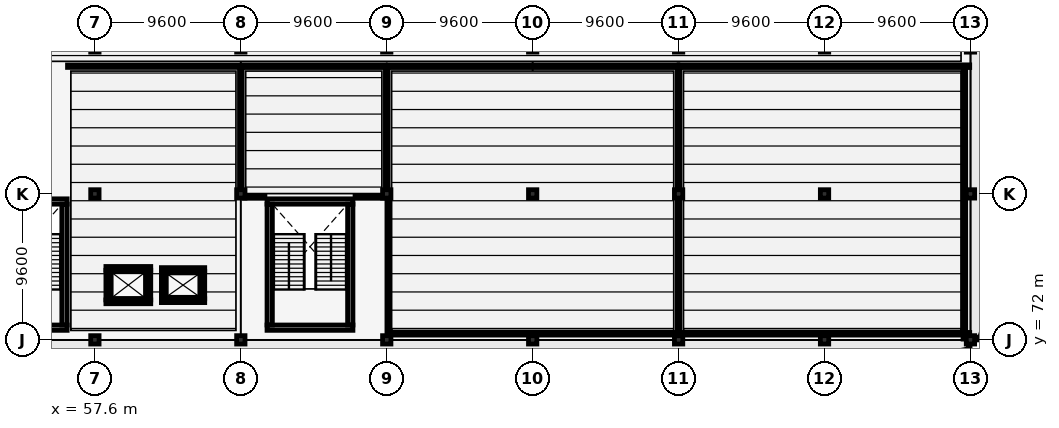
"""IFC4 building model, lengths in metres.
Left out: names, types, materials, properties, quantities, classifications, styles, units other than length and angle.
Written with IfcOpenShell. Run it as: python <this file> out.ifc"""

import sys

from ifc_helpers import new_model, si_unit, direction, frame, frame_2d, origin, origin_2d, place, context, subcontext, project, spatial, rectangle, extrude, element, fill, save


model = new_model("IFC4")
c1 = context("Model", 3, precision=1e-05, world=origin(), true_north=direction((0.0, 1.0)))
c2 = subcontext(c1, "Body", "Model", "MODEL_VIEW")
j1 = project(units=[si_unit("LENGTHUNIT", "METRE"), si_unit("PLANEANGLEUNIT", "RADIAN")], contexts=[c1])
p1 = place(None, origin())
s1 = spatial("IfcSite", under=j1, at=p1, CompositionType="ELEMENT")
p2 = place(p1, origin())
s2 = spatial("IfcBuilding", under=s1, at=p2, CompositionType="ELEMENT")
p3 = place(p2, frame((0.0, 0.0, 4.8)))
s3 = spatial("IfcBuildingStorey", under=s2, at=p3, CompositionType="ELEMENT", Elevation=4.8)
for number, where, z_axis, x_axis in (
    (1, (57.6, 72.0, 0.0), (0.0, 0.0, 1.0), (1.0, 0.0, 0.0)),
    (2, (57.6, 81.6, 0.0), (0.0, 0.0, 1.0), (1.0, 0.0, 0.0)),
    (3, (67.2, 72.0, 0.0), (0.0, 0.0, 1.0), (1.0, 0.0, 0.0)),
    (4, (67.2, 81.6, 0.0), (0.0, 0.0, 1.0), (1.0, 0.0, 0.0)),
    (5, (76.8, 72.0, 0.0), (0.0, 0.0, 1.0), (1.0, 0.0, 0.0)),
    (6, (76.8, 81.6, 0.0), (0.0, 0.0, 1.0), (1.0, 0.0, 0.0)),
    (7, (86.4, 72.0, 0.0), (0.0, 0.0, 1.0), (1.0, 0.0, 0.0)),
    (8, (86.4, 81.6, 0.0), (0.0, 0.0, 1.0), (1.0, 0.0, 0.0)),
    (9, (96.0, 72.0, 0.0), (0.0, 0.0, 1.0), (1.0, 0.0, 0.0)),
    (10, (96.0, 81.6, 0.0), (0.0, 0.0, 1.0), (1.0, 0.0, 0.0)),
    (11, (105.6, 72.0, 0.0), (0.0, 0.0, 1.0), (1.0, 0.0, 0.0)),
    (12, (105.6, 81.6, 0.0), (0.0, 0.0, 1.0), (1.0, 0.0, 0.0)),
    (13, (115.2, 72.0, 0.0), (0.0, 0.0, 1.0), (1.0, 0.0, 0.0)),
    (14, (115.2, 81.6, 0.0), (0.0, 0.0, 1.0), (1.0, 0.0, 0.0)),
):
    element("IfcColumn", number, at=place(p3, frame(where, z_axis=z_axis, x_axis=x_axis)), inside=s3, PredefinedType="COLUMN", context=c2, shape_type="SweptSolid", body=[
        extrude(rectangle(XDim=0.55, YDim=0.55, at=origin_2d()), origin(), (0.0, 0.0, 1.0), 4.8),
    ])
for number, where, z_axis, x_axis in (
    (15, (55.775, 72.8, 0.0), (0.0, 0.0, 1.0), (-1.0, 0.0, 0.0)),
    (16, (50.125, 81.1, 0.0), (0.0, 0.0, 1.0), (1.0, 0.0, 0.0)),
):
    element("IfcWall", number, at=place(p3, frame(where, z_axis=z_axis, x_axis=x_axis)), inside=s3, PredefinedType="SHEAR", context=c2, shape_type="SweptSolid", body=[
        extrude(rectangle(XDim=5.65, YDim=0.35, at=frame_2d((2.825, 0.0))), origin(), (0.0, 0.0, 1.0), 4.55),
    ])
p4 = place(p3, frame((55.6, 80.925, 0.0), z_axis=(0.0, 0.0, 1.0), x_axis=(0.0, -1.0, 0.0)))
e17 = element("IfcWall", 17, at=p4, inside=s3, PredefinedType="SHEAR", context=c2, shape_type="SweptSolid", body=[
    extrude(rectangle(XDim=7.95, YDim=0.35, at=frame_2d((3.975, 0.0))), origin(), (0.0, 0.0, 1.0), 4.55),
])
p5 = place(p4, frame((5.68, 0.0, 0.0)))
e18 = element("IfcOpeningElement", 18, at=p5, cuts=e17, PredefinedType="OPENING", context=c2, shape_type="SweptSolid", body=[
    extrude(rectangle(XDim=2.05, YDim=2.15, at=frame_2d((1.025, 1.075))), frame((0.0, 0.185, 0.0), z_axis=(0.0, -1.0, 0.0), x_axis=(1.0, 0.0, 0.0)), (0.0, 0.0, 1.0), 0.37),
])
for number, where, z_axis, x_axis in (
    (19, (74.575, 72.8, 0.0), (0.0, 0.0, 1.0), (-1.0, 0.0, 0.0)),
    (20, (68.925, 81.1, 0.0), (0.0, 0.0, 1.0), (1.0, 0.0, 0.0)),
):
    element("IfcWall", number, at=place(p3, frame(where, z_axis=z_axis, x_axis=x_axis)), inside=s3, PredefinedType="SHEAR", context=c2, shape_type="SweptSolid", body=[
        extrude(rectangle(XDim=5.65, YDim=0.35, at=frame_2d((2.825, 0.0))), origin(), (0.0, 0.0, 1.0), 4.55),
    ])
p6 = place(p3, frame((69.1, 72.975, 0.0), z_axis=(0.0, 0.0, 1.0), x_axis=(0.0, 1.0, 0.0)))
e21 = element("IfcWall", 21, at=p6, inside=s3, PredefinedType="SHEAR", context=c2, shape_type="SweptSolid", body=[
    extrude(rectangle(XDim=7.95, YDim=0.35, at=frame_2d((3.975, 0.0))), origin(), (0.0, 0.0, 1.0), 4.55),
])
p7 = place(p3, frame((74.4, 80.925, 0.0), z_axis=(0.0, 0.0, 1.0), x_axis=(0.0, -1.0, 0.0)))
e22 = element("IfcWall", 22, at=p7, inside=s3, PredefinedType="SHEAR", context=c2, shape_type="SweptSolid", body=[
    extrude(rectangle(XDim=7.95, YDim=0.35, at=frame_2d((3.975, 0.0))), origin(), (0.0, 0.0, 1.0), 4.55),
])
p8 = place(p7, frame((5.68, 0.0, 0.0)))
e23 = element("IfcOpeningElement", 23, at=p8, cuts=e22, PredefinedType="OPENING", context=c2, shape_type="SweptSolid", body=[
    extrude(rectangle(XDim=2.05, YDim=2.15, at=frame_2d((1.025, 1.075))), frame((0.0, 0.185, 0.0), z_axis=(0.0, -1.0, 0.0), x_axis=(1.0, 0.0, 0.0)), (0.0, 0.0, 1.0), 0.37),
])
p9 = place(p3, frame((61.275, 74.5, 0.0), z_axis=(0.0, 0.0, 1.0), x_axis=(-1.0, 0.0, 0.0)))
e24 = element("IfcWall", 24, at=p9, inside=s3, PredefinedType="SOLIDWALL", context=c2, shape_type="SweptSolid", body=[
    extrude(rectangle(XDim=2.95, YDim=0.25, at=frame_2d((1.475, 0.0))), origin(), (0.0, 0.0, 1.0), 4.55),
])
p10 = place(p3, frame((58.325, 76.7, 0.0), z_axis=(0.0, 0.0, 1.0), x_axis=(1.0, 0.0, 0.0)))
e25 = element("IfcWall", 25, at=p10, inside=s3, PredefinedType="SOLIDWALL", context=c2, shape_type="SweptSolid", body=[
    extrude(rectangle(XDim=2.95, YDim=0.25, at=frame_2d((1.475, 0.0))), origin(), (0.0, 0.0, 1.0), 4.55),
])
p11 = place(p10, frame((0.925, 0.0, 0.0)))
e26 = element("IfcOpeningElement", 26, at=p11, cuts=e25, PredefinedType="OPENING", context=c2, shape_type="SweptSolid", body=[
    extrude(rectangle(XDim=1.1, YDim=2.15, at=frame_2d((0.55, 1.075))), frame((0.0, 0.135, 0.0), z_axis=(0.0, -1.0, 0.0), x_axis=(1.0, 0.0, 0.0)), (0.0, 0.0, 1.0), 0.27),
])
for number, where, z_axis, x_axis in (
    (27, (58.45, 74.625, 0.0), (0.0, 0.0, 1.0), (0.0, 1.0, 0.0)),
    (28, (61.15, 76.575, 0.0), (0.0, 0.0, 1.0), (0.0, -1.0, 0.0)),
):
    element("IfcWall", number, at=place(p3, frame(where, z_axis=z_axis, x_axis=x_axis)), inside=s3, PredefinedType="SOLIDWALL", context=c2, shape_type="SweptSolid", body=[
        extrude(rectangle(XDim=1.95, YDim=0.25, at=frame_2d((0.975, 0.0))), origin(), (0.0, 0.0, 1.0), 4.55),
    ])
p12 = place(p3, frame((64.825, 74.575, 0.0), z_axis=(0.0, 0.0, 1.0), x_axis=(-1.0, 0.0, 0.0)))
e29 = element("IfcWall", 29, at=p12, inside=s3, PredefinedType="SOLIDWALL", context=c2, shape_type="SweptSolid", body=[
    extrude(rectangle(XDim=2.85, YDim=0.25, at=frame_2d((1.425, 0.0))), origin(), (0.0, 0.0, 1.0), 4.55),
])
p13 = place(p3, frame((61.975, 76.625, 0.0), z_axis=(0.0, 0.0, 1.0), x_axis=(1.0, 0.0, 0.0)))
e30 = element("IfcWall", 30, at=p13, inside=s3, PredefinedType="SOLIDWALL", context=c2, shape_type="SweptSolid", body=[
    extrude(rectangle(XDim=2.85, YDim=0.25, at=frame_2d((1.425, 0.0))), origin(), (0.0, 0.0, 1.0), 4.55),
])
p14 = place(p13, frame((0.875, 0.0, 0.0)))
e31 = element("IfcOpeningElement", 31, at=p14, cuts=e30, PredefinedType="OPENING", context=c2, shape_type="SweptSolid", body=[
    extrude(rectangle(XDim=1.1, YDim=2.15, at=frame_2d((0.55, 1.075))), frame((0.0, 0.135, 0.0), z_axis=(0.0, -1.0, 0.0), x_axis=(1.0, 0.0, 0.0)), (0.0, 0.0, 1.0), 0.27),
])
for number, where, z_axis, x_axis in (
    (32, (62.1, 74.7, 0.0), (0.0, 0.0, 1.0), (0.0, 1.0, 0.0)),
    (33, (64.7, 76.5, 0.0), (0.0, 0.0, 1.0), (0.0, -1.0, 0.0)),
):
    element("IfcWall", number, at=place(p3, frame(where, z_axis=z_axis, x_axis=x_axis)), inside=s3, PredefinedType="SOLIDWALL", context=c2, shape_type="SweptSolid", body=[
        extrude(rectangle(XDim=1.8, YDim=0.25, at=frame_2d((0.9, 0.0))), origin(), (0.0, 0.0, 1.0), 4.55),
    ])
p15 = place(p3, frame((67.2, 81.4, 0.0), z_axis=(0.0, 0.0, 1.0), x_axis=(0.0, 1.0, 0.0)))
e34 = element("IfcWall", 34, at=p15, inside=s3, PredefinedType="PARTITIONING", context=c2, shape_type="SweptSolid", body=[
    extrude(rectangle(XDim=8.5, YDim=0.175, at=frame_2d((4.25, 0.0))), origin(), (0.0, 0.0, 1.0), 4.037),
])
p16 = place(p15, frame((3.45, 0.0, 0.0)))
e35 = element("IfcOpeningElement", 35, at=p16, cuts=e34, PredefinedType="OPENING", context=c2, shape_type="SweptSolid", body=[
    extrude(rectangle(XDim=1.6, YDim=2.15, at=frame_2d((0.8, 1.075))), frame((0.0, 0.097, 0.0), z_axis=(0.0, -1.0, 0.0), x_axis=(1.0, 0.0, 0.0)), (0.0, 0.0, 1.0), 0.195),
])
p17 = place(p3, frame((55.8, 90.0, 0.0), z_axis=(0.0, 0.0, 1.0), x_axis=(1.0, 0.0, 0.0)))
e36 = element("IfcWall", 36, at=p17, inside=s3, PredefinedType="PARTITIONING", context=c2, shape_type="SweptSolid", body=[
    extrude(rectangle(XDim=11.3, YDim=0.16, at=frame_2d((5.65, 0.0))), origin(), (0.0, 0.0, 1.0), 4.42),
])
p18 = place(p17, frame((4.75, 0.0, 0.0)))
e37 = element("IfcOpeningElement", 37, at=p18, cuts=e36, PredefinedType="OPENING", context=c2, shape_type="SweptSolid", body=[
    extrude(rectangle(XDim=1.8, YDim=2.15, at=frame_2d((0.9, 1.075))), frame((0.0, 0.09, 0.0), z_axis=(0.0, -1.0, 0.0), x_axis=(1.0, 0.0, 0.0)), (0.0, 0.0, 1.0), 0.18),
])
p19 = place(p3, frame((76.8, 81.4, 0.0), z_axis=(0.0, 0.0, 1.0), x_axis=(0.0, 1.0, 0.0)))
e38 = element("IfcWall", 38, at=p19, inside=s3, PredefinedType="PARTITIONING", context=c2, shape_type="SweptSolid", body=[
    extrude(rectangle(XDim=8.5, YDim=0.175, at=frame_2d((4.25, 0.0))), origin(), (0.0, 0.0, 1.0), 4.037),
])
p20 = place(p3, frame((67.3, 90.0, 0.0), z_axis=(0.0, 0.0, 1.0), x_axis=(1.0, 0.0, 0.0)))
e39 = element("IfcWall", 39, at=p20, inside=s3, PredefinedType="PARTITIONING", context=c2, shape_type="SweptSolid", body=[
    extrude(rectangle(XDim=9.4, YDim=0.175, at=frame_2d((4.7, 0.0))), origin(), (0.0, 0.0, 1.0), 4.42),
])
p21 = place(p20, frame((3.9, 0.0, 0.0)))
e40 = element("IfcOpeningElement", 40, at=p21, cuts=e39, PredefinedType="OPENING", context=c2, shape_type="SweptSolid", body=[
    extrude(rectangle(XDim=1.6, YDim=2.15, at=frame_2d((0.8, 1.075))), frame((0.0, 0.097, 0.0), z_axis=(0.0, -1.0, 0.0), x_axis=(1.0, 0.0, 0.0)), (0.0, 0.0, 1.0), 0.195),
])
p22 = place(p3, frame((96.0, 72.05, 0.0), z_axis=(0.0, 0.0, 1.0), x_axis=(0.0, 1.0, 0.0)))
e41 = element("IfcWall", 41, at=p22, inside=s3, PredefinedType="PARTITIONING", context=c2, shape_type="SweptSolid", body=[
    extrude(rectangle(XDim=17.85, YDim=0.175, at=frame_2d((8.925, 0.0))), origin(), (0.0, 0.0, 1.0), 4.037),
])
p23 = place(p3, frame((76.9, 90.0, 0.0), z_axis=(0.0, 0.0, 1.0), x_axis=(1.0, 0.0, 0.0)))
e42 = element("IfcWall", 42, at=p23, inside=s3, PredefinedType="PARTITIONING", context=c2, shape_type="SweptSolid", body=[
    extrude(rectangle(XDim=19.05, YDim=0.175, at=frame_2d((9.525, 0.0))), origin(), (0.0, 0.0, 1.0), 4.42),
])
p24 = place(p23, frame((6.216, 0.0, 0.0)))
e43 = element("IfcOpeningElement", 43, at=p24, cuts=e42, PredefinedType="OPENING", context=c2, shape_type="SweptSolid", body=[
    extrude(rectangle(XDim=1.6, YDim=2.15, at=frame_2d((0.8, 1.075))), frame((0.0, 0.097, 0.0), z_axis=(0.0, -1.0, 0.0), x_axis=(1.0, 0.0, 0.0)), (0.0, 0.0, 1.0), 0.195),
])
p25 = place(p3, frame((96.03, 90.0, 0.0), z_axis=(0.0, 0.0, 1.0), x_axis=(1.0, 0.0, 0.0)))
e44 = element("IfcWall", 44, at=p25, inside=s3, PredefinedType="PARTITIONING", context=c2, shape_type="SweptSolid", body=[
    extrude(rectangle(XDim=19.12, YDim=0.175, at=frame_2d((9.56, 0.0))), origin(), (0.0, 0.0, 1.0), 4.42),
])
p26 = place(p25, frame((6.24, 0.0, 0.0)))
e45 = element("IfcOpeningElement", 45, at=p26, cuts=e44, PredefinedType="OPENING", context=c2, shape_type="SweptSolid", body=[
    extrude(rectangle(XDim=1.6, YDim=2.15, at=frame_2d((0.8, 1.075))), frame((0.0, 0.097, 0.0), z_axis=(0.0, -1.0, 0.0), x_axis=(1.0, 0.0, 0.0)), (0.0, 0.0, 1.0), 0.195),
])
p27 = place(p3, frame((67.44, 81.4, 0.0), z_axis=(0.0, 0.0, 1.0), x_axis=(1.0, 0.0, 0.0)))
e46 = element("IfcWall", 46, at=p27, inside=s3, PredefinedType="PARTITIONING", context=c2, shape_type="SweptSolid", body=[
    extrude(rectangle(XDim=1.345, YDim=0.175, at=frame_2d((0.672, 0.0))), origin(), (0.0, 0.0, 1.0), 3.895),
])
p28 = place(p3, frame((74.715, 81.4, 0.0), z_axis=(0.0, 0.0, 1.0), x_axis=(1.0, 0.0, 0.0)))
e47 = element("IfcWall", 47, at=p28, inside=s3, PredefinedType="PARTITIONING", context=c2, shape_type="SweptSolid", body=[
    extrude(rectangle(XDim=1.845, YDim=0.175, at=frame_2d((0.922, 0.0))), origin(), (0.0, 0.0, 1.0), 3.895),
])
p29 = place(p3, frame((77.04, 72.4, 0.0), z_axis=(0.0, 0.0, 1.0), x_axis=(1.0, 0.0, 0.0)))
e48 = element("IfcWall", 48, at=p29, inside=s3, PredefinedType="PARTITIONING", context=c2, shape_type="SweptSolid", body=[
    extrude(rectangle(XDim=18.91, YDim=0.175, at=frame_2d((9.455, 0.0))), origin(), (0.0, 0.0, 1.0), 4.42),
])
p30 = place(p3, frame((76.9, 72.05, 0.0), z_axis=(0.0, 0.0, 1.0), x_axis=(0.0, 1.0, 0.0)))
e49 = element("IfcWall", 49, at=p30, inside=s3, PredefinedType="PARTITIONING", context=c2, shape_type="SweptSolid", body=[
    extrude(rectangle(XDim=9.21, YDim=0.175, at=frame_2d((4.605, 0.0))), origin(), (0.0, 0.0, 1.0), 4.037),
])
p31 = place(p3, frame((96.09, 72.4, 0.0), z_axis=(0.0, 0.0, 1.0), x_axis=(1.0, 0.0, 0.0)))
e50 = element("IfcWall", 50, at=p31, inside=s3, PredefinedType="PARTITIONING", context=c2, shape_type="SweptSolid", body=[
    extrude(rectangle(XDim=19.06, YDim=0.175, at=frame_2d((9.53, 0.0))), origin(), (0.0, 0.0, 1.0), 4.42),
])
p32 = place(p3, frame((114.8, 72.05, 0.0), z_axis=(0.0, 0.0, 1.0), x_axis=(0.0, 1.0, 0.0)))
e51 = element("IfcWall", 51, at=p32, inside=s3, PredefinedType="PARTITIONING", context=c2, shape_type="SweptSolid", body=[
    extrude(rectangle(XDim=17.71, YDim=0.175, at=frame_2d((8.855, 0.0))), origin(), (0.0, 0.0, 1.0), 4.42),
])
p33 = place(p5, origin())
e52 = element("IfcDoor", 52, at=p33, inside=s3, OperationType="DOUBLE_DOOR_SINGLE_SWING", PredefinedType="DOOR", context=c2, shape_type="SweptSolid", body=[
    extrude(rectangle(XDim=2.05, YDim=2.15, at=frame_2d((1.025, 1.075))), frame((0.0, 0.025, 0.0), z_axis=(0.0, -1.0, 0.0), x_axis=(1.0, 0.0, 0.0)), (0.0, 0.0, 1.0), 0.05),
])
fill(e18, e52)
p34 = place(p8, origin())
e53 = element("IfcDoor", 53, at=p34, inside=s3, OperationType="DOUBLE_DOOR_SINGLE_SWING", PredefinedType="DOOR", context=c2, shape_type="SweptSolid", body=[
    extrude(rectangle(XDim=2.05, YDim=2.15, at=frame_2d((1.025, 1.075))), frame((0.0, 0.025, 0.0), z_axis=(0.0, -1.0, 0.0), x_axis=(1.0, 0.0, 0.0)), (0.0, 0.0, 1.0), 0.05),
])
fill(e23, e53)
p35 = place(p11, origin())
e54 = element("IfcDoor", 54, at=p35, inside=s3, OperationType="DOUBLE_DOOR_SLIDING", PredefinedType="DOOR", context=c2, shape_type="SweptSolid", body=[
    extrude(rectangle(XDim=1.1, YDim=2.15, at=frame_2d((0.55, 1.075))), frame((0.0, 0.025, 0.0), z_axis=(0.0, -1.0, 0.0), x_axis=(1.0, 0.0, 0.0)), (0.0, 0.0, 1.0), 0.05),
])
fill(e26, e54)
p36 = place(p14, origin())
e55 = element("IfcDoor", 55, at=p36, inside=s3, OperationType="DOUBLE_DOOR_SLIDING", PredefinedType="DOOR", context=c2, shape_type="SweptSolid", body=[
    extrude(rectangle(XDim=1.1, YDim=2.15, at=frame_2d((0.55, 1.075))), frame((0.0, 0.025, 0.0), z_axis=(0.0, -1.0, 0.0), x_axis=(1.0, 0.0, 0.0)), (0.0, 0.0, 1.0), 0.05),
])
fill(e31, e55)
p37 = place(p16, origin())
e56 = element("IfcDoor", 56, at=p37, inside=s3, OperationType="DOUBLE_DOOR_SINGLE_SWING", PredefinedType="DOOR", context=c2, shape_type="SweptSolid", body=[
    extrude(rectangle(XDim=1.6, YDim=2.15, at=frame_2d((0.8, 1.075))), frame((0.0, 0.025, 0.0), z_axis=(0.0, -1.0, 0.0), x_axis=(1.0, 0.0, 0.0)), (0.0, 0.0, 1.0), 0.05),
])
fill(e35, e56)
p38 = place(p18, origin())
e57 = element("IfcDoor", 57, at=p38, inside=s3, OperationType="DOUBLE_DOOR_SINGLE_SWING", PredefinedType="DOOR", context=c2, shape_type="SweptSolid", body=[
    extrude(rectangle(XDim=1.8, YDim=2.15, at=frame_2d((0.9, 1.075))), frame((0.0, 0.025, 0.0), z_axis=(0.0, -1.0, 0.0), x_axis=(1.0, 0.0, 0.0)), (0.0, 0.0, 1.0), 0.05),
])
fill(e37, e57)
p39 = place(p21, origin())
e58 = element("IfcDoor", 58, at=p39, inside=s3, OperationType="DOUBLE_DOOR_SINGLE_SWING", PredefinedType="DOOR", context=c2, shape_type="SweptSolid", body=[
    extrude(rectangle(XDim=1.6, YDim=2.15, at=frame_2d((0.8, 1.075))), frame((0.0, 0.025, 0.0), z_axis=(0.0, -1.0, 0.0), x_axis=(1.0, 0.0, 0.0)), (0.0, 0.0, 1.0), 0.05),
])
fill(e40, e58)
p40 = place(p24, origin())
e59 = element("IfcDoor", 59, at=p40, inside=s3, OperationType="DOUBLE_DOOR_SINGLE_SWING", PredefinedType="DOOR", context=c2, shape_type="SweptSolid", body=[
    extrude(rectangle(XDim=1.6, YDim=2.15, at=frame_2d((0.8, 1.075))), frame((0.0, 0.025, 0.0), z_axis=(0.0, -1.0, 0.0), x_axis=(1.0, 0.0, 0.0)), (0.0, 0.0, 1.0), 0.05),
])
fill(e43, e59)
p41 = place(p26, origin())
e60 = element("IfcDoor", 60, at=p41, inside=s3, OperationType="DOUBLE_DOOR_SINGLE_SWING", PredefinedType="DOOR", context=c2, shape_type="SweptSolid", body=[
    extrude(rectangle(XDim=1.6, YDim=2.15, at=frame_2d((0.8, 1.075))), frame((0.0, 0.025, 0.0), z_axis=(0.0, -1.0, 0.0), x_axis=(1.0, 0.0, 0.0)), (0.0, 0.0, 1.0), 0.05),
])
fill(e45, e60)
save(model, sys.argv[1])
